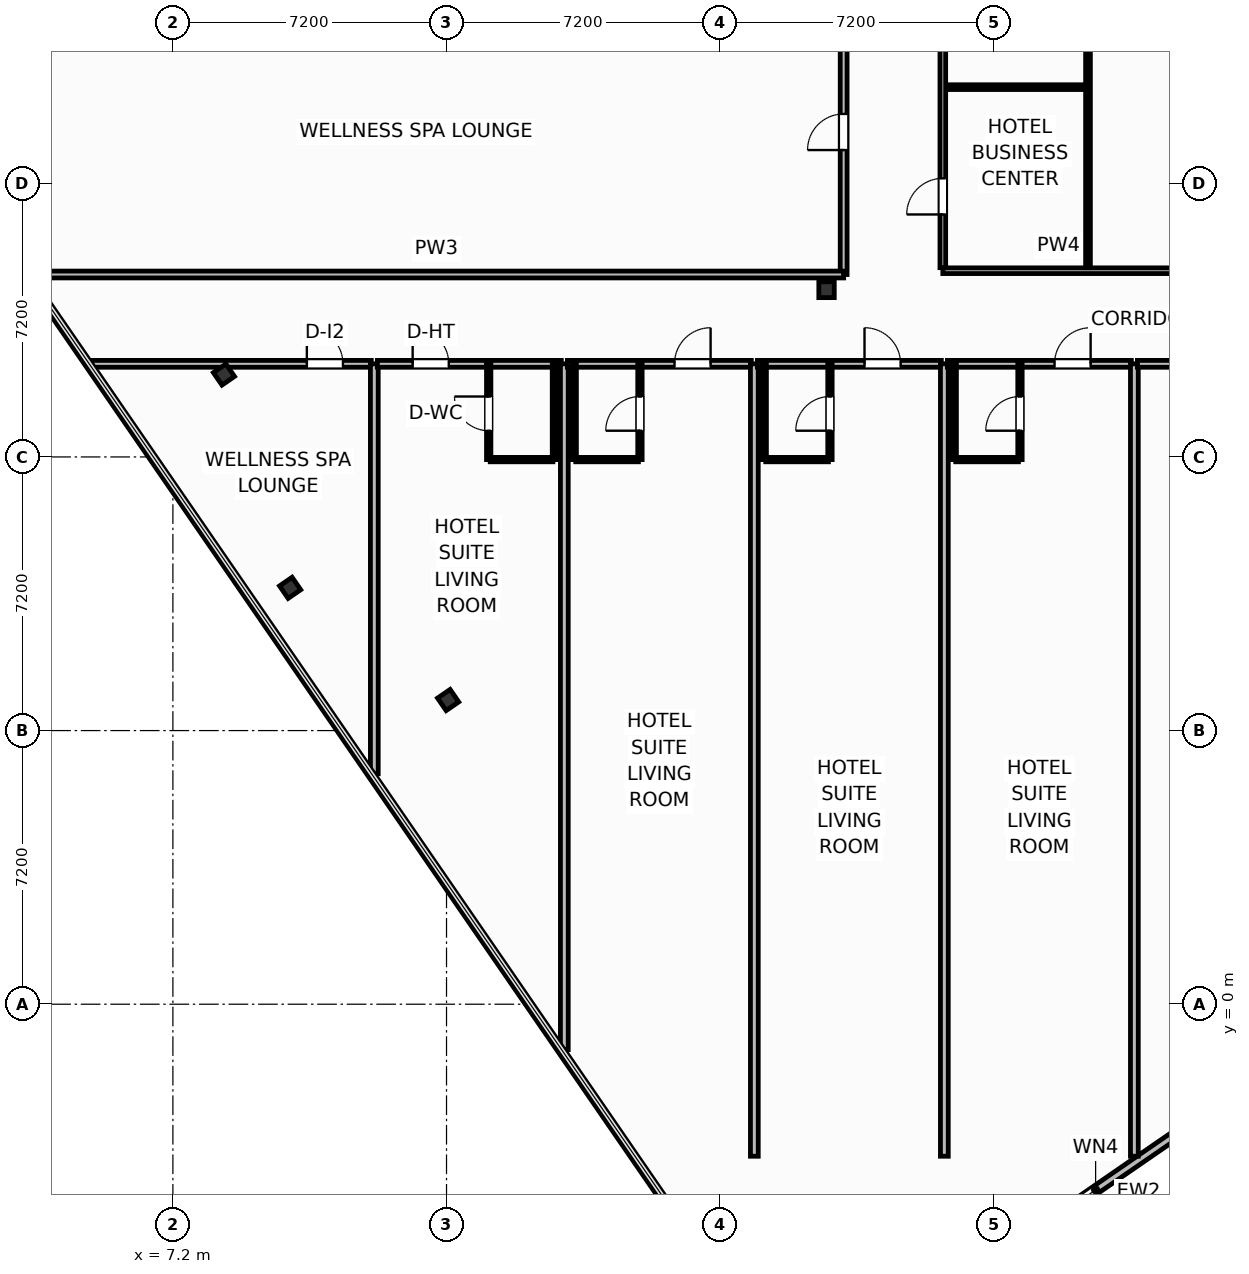
"""IFC4 building model, lengths in metres.
Left out: names, types, materials, properties, quantities, classifications, styles, units other than length and angle.
Written with IfcOpenShell. Run it as: python <this file> out.ifc"""

import sys

from ifc_helpers import new_model, si_unit, direction, frame, frame_2d, origin, origin_2d, place, context, subcontext, project, spatial, rectangle, i_section, extrude, element, fill, save


model = new_model("IFC4")
c1 = context("Model", 3, precision=1e-05, world=origin(), true_north=direction((0.0, 1.0)))
c2 = subcontext(c1, "Body", "Model", "MODEL_VIEW")
j1 = project(units=[si_unit("LENGTHUNIT", "METRE"), si_unit("PLANEANGLEUNIT", "RADIAN")], contexts=[c1])
p1 = place(None, origin())
s1 = spatial("IfcSite", under=j1, at=p1, CompositionType="ELEMENT")
p2 = place(p1, origin())
s2 = spatial("IfcBuilding", under=s1, at=p2, CompositionType="ELEMENT")
p3 = place(p2, frame((0.0, 0.0, 280.4)))
s3 = spatial("IfcBuildingStorey", under=s2, at=p3, CompositionType="ELEMENT", Elevation=280.4)
p4 = place(p3, frame((24.4, 18.8, 0.0), z_axis=(0.0, 0.0, 1.0), x_axis=(1.0, 0.0, 0.0)))
e1 = element("IfcColumn", 1, at=p4, inside=s3, PredefinedType="COLUMN", context=c2, shape_type="SweptSolid", body=[
    extrude(i_section(OverallWidth=0.406, OverallDepth=0.416, WebThickness=0.03, FlangeThickness=0.048, FilletRadius=0.025, at=origin_2d()), origin(), (0.0, 0.0, 1.0), 3.7),
])
for number, where, z_axis, x_axis in (
    (2, (8.543, 16.569, 0.0), (0.0, 0.0, 1.0), (0.824, 0.567, 0.0)),
    (3, (10.284, 10.956, 0.0), (0.0, 0.0, 1.0), (0.824, 0.567, 0.0)),
    (4, (14.443, 8.004, 0.0), (0.0, 0.0, 1.0), (0.824, 0.567, 0.0)),
):
    element("IfcColumn", number, at=place(p3, frame(where, z_axis=z_axis, x_axis=x_axis)), inside=s3, PredefinedType="COLUMN", context=c2, shape_type="SweptSolid", body=[
        extrude(i_section(OverallWidth=0.401, OverallDepth=0.399, WebThickness=0.025, FlangeThickness=0.04, FilletRadius=0.022, at=origin_2d()), origin(), (0.0, 0.0, 1.0), 3.7),
    ])
p5 = place(p3, frame((27.704, -7.488, 0.0), z_axis=(0.0, 0.0, 1.0), x_axis=(0.823529068157, 0.567274073003, 0.0)))
e5 = element("IfcWall", 5, at=p5, inside=s3, PredefinedType="SOLIDWALL", context=c2, shape_type="SweptSolid", body=[
    extrude(rectangle(XDim=10.98, YDim=0.22, at=frame_2d((5.49, 0.0))), origin(), (0.0, 0.0, 1.0), 2.73),
])
p6 = place(p5, frame((2.486, 0.0, 0.8)))
e6 = element("IfcOpeningElement", 6, at=p6, cuts=e5, PredefinedType="OPENING", context=c2, shape_type="SweptSolid", body=[
    extrude(rectangle(XDim=2.1, YDim=1.75, at=frame_2d((1.05, 0.875))), frame((0.0, 0.12, 0.0), z_axis=(0.0, -1.0, 0.0), x_axis=(1.0, 0.0, 0.0)), (0.0, 0.0, 1.0), 0.24),
])
p7 = place(p3, frame((5.038, 16.85, 0.0), z_axis=(0.0, 0.0, 1.0), x_axis=(1.0, 0.0, 0.0)))
e7 = element("IfcWall", 7, at=p7, inside=s3, PredefinedType="PARTITIONING", context=c2, shape_type="SweptSolid", body=[
    extrude(rectangle(XDim=7.382, YDim=0.18, at=frame_2d((3.691, 0.0))), origin(), (0.0, 0.0, 1.0), 2.739),
])
p8 = place(p7, frame((5.687, 0.0, 0.0)))
e8 = element("IfcOpeningElement", 8, at=p8, cuts=e7, PredefinedType="OPENING", context=c2, shape_type="SweptSolid", body=[
    extrude(rectangle(XDim=0.95, YDim=2.05, at=frame_2d((0.475, 1.025))), frame((0.0, 0.1, 0.0), z_axis=(0.0, -1.0, 0.0), x_axis=(1.0, 0.0, 0.0)), (0.0, 0.0, 1.0), 0.2),
])
p9 = place(p3, frame((12.5, 6.064, 0.0), z_axis=(0.0, 0.0, 1.0), x_axis=(0.0, 1.0, 0.0)))
e9 = element("IfcWall", 9, at=p9, inside=s3, PredefinedType="PARTITIONING", context=c2, shape_type="SweptSolid", body=[
    extrude(rectangle(XDim=10.786, YDim=0.205, at=frame_2d((5.393, 0.0))), origin(), (0.0, 0.0, 1.0), 3.45),
])
p10 = place(p3, frame((12.58, 16.85, 0.0), z_axis=(0.0, 0.0, 1.0), x_axis=(1.0, 0.0, 0.0)))
e10 = element("IfcWall", 10, at=p10, inside=s3, PredefinedType="PARTITIONING", context=c2, shape_type="SweptSolid", body=[
    extrude(rectangle(XDim=4.84, YDim=0.18, at=frame_2d((2.42, 0.0))), origin(), (0.0, 0.0, 1.0), 3.45),
])
p11 = place(p10, frame((0.929, 0.0, 0.0)))
e11 = element("IfcOpeningElement", 11, at=p11, cuts=e10, PredefinedType="OPENING", context=c2, shape_type="SweptSolid", body=[
    extrude(rectangle(XDim=0.95, YDim=2.15, at=frame_2d((0.475, 1.075))), frame((0.0, 0.1, 0.0), z_axis=(0.0, -1.0, 0.0), x_axis=(1.0, 0.0, 0.0)), (0.0, 0.0, 1.0), 0.2),
])
p12 = place(p3, frame((15.55, 14.33, 0.0), z_axis=(0.0, 0.0, 1.0), x_axis=(1.0, 0.0, 0.0)))
e12 = element("IfcWall", 12, at=p12, inside=s3, PredefinedType="PARTITIONING", context=c2, shape_type="SweptSolid", body=[
    extrude(rectangle(XDim=1.65, YDim=0.115, at=frame_2d((0.825, 0.0))), origin(), (0.0, 0.0, 1.0), 3.45),
])
p13 = place(p3, frame((15.51, 14.33, 0.0), z_axis=(0.0, 0.0, 1.0), x_axis=(0.0, 1.0, 0.0)))
e13 = element("IfcWall", 13, at=p13, inside=s3, PredefinedType="PARTITIONING", context=c2, shape_type="SweptSolid", body=[
    extrude(rectangle(XDim=2.52, YDim=0.115, at=frame_2d((1.26, 0.0))), origin(), (0.0, 0.0, 1.0), 3.45),
])
p14 = place(p13, frame((0.76, 0.0, 0.0)))
e14 = element("IfcOpeningElement", 14, at=p14, cuts=e13, PredefinedType="OPENING", context=c2, shape_type="SweptSolid", body=[
    extrude(rectangle(XDim=0.9, YDim=2.05, at=frame_2d((0.45, 1.025))), frame((0.0, 0.067, 0.0), z_axis=(0.0, -1.0, 0.0), x_axis=(1.0, 0.0, 0.0)), (0.0, 0.0, 1.0), 0.135),
])
p15 = place(p3, frame((17.24, 14.33, 0.0), z_axis=(0.0, 0.0, 1.0), x_axis=(0.0, 1.0, 0.0)))
e15 = element("IfcWall", 15, at=p15, inside=s3, PredefinedType="PARTITIONING", context=c2, shape_type="SweptSolid", body=[
    extrude(rectangle(XDim=2.52, YDim=0.115, at=frame_2d((1.26, 0.0))), origin(), (0.0, 0.0, 1.0), 3.45),
])
p16 = place(p3, frame((17.5, -1.195, 0.0), z_axis=(0.0, 0.0, 1.0), x_axis=(0.0, 1.0, 0.0)))
e16 = element("IfcWall", 16, at=p16, inside=s3, PredefinedType="PARTITIONING", context=c2, shape_type="SweptSolid", body=[
    extrude(rectangle(XDim=18.045, YDim=0.205, at=frame_2d((9.022, 0.0))), origin(), (0.0, 0.0, 1.0), 3.45),
])
p17 = place(p3, frame((17.58, 16.85, 0.0), z_axis=(0.0, 0.0, 1.0), x_axis=(1.0, 0.0, 0.0)))
e17 = element("IfcWall", 17, at=p17, inside=s3, PredefinedType="PARTITIONING", context=c2, shape_type="SweptSolid", body=[
    extrude(rectangle(XDim=4.84, YDim=0.18, at=frame_2d((2.42, 0.0))), origin(), (0.0, 0.0, 1.0), 3.45),
])
p18 = place(p17, frame((2.819, 0.0, 0.0)))
e18 = element("IfcOpeningElement", 18, at=p18, cuts=e17, PredefinedType="OPENING", context=c2, shape_type="SweptSolid", body=[
    extrude(rectangle(XDim=0.95, YDim=2.15, at=frame_2d((0.475, 1.075))), frame((0.0, 0.1, 0.0), z_axis=(0.0, -1.0, 0.0), x_axis=(1.0, 0.0, 0.0)), (0.0, 0.0, 1.0), 0.2),
])
p19 = place(p3, frame((17.8, 14.33, 0.0), z_axis=(0.0, 0.0, 1.0), x_axis=(1.0, 0.0, 0.0)))
e19 = element("IfcWall", 19, at=p19, inside=s3, PredefinedType="PARTITIONING", context=c2, shape_type="SweptSolid", body=[
    extrude(rectangle(XDim=1.65, YDim=0.115, at=frame_2d((0.825, 0.0))), origin(), (0.0, 0.0, 1.0), 3.45),
])
p20 = place(p3, frame((19.49, 14.33, 0.0), z_axis=(0.0, 0.0, 1.0), x_axis=(0.0, 1.0, 0.0)))
e20 = element("IfcWall", 20, at=p20, inside=s3, PredefinedType="PARTITIONING", context=c2, shape_type="SweptSolid", body=[
    extrude(rectangle(XDim=2.52, YDim=0.115, at=frame_2d((1.26, 0.0))), origin(), (0.0, 0.0, 1.0), 3.45),
])
p21 = place(p20, frame((0.76, 0.0, 0.0)))
e21 = element("IfcOpeningElement", 21, at=p21, cuts=e20, PredefinedType="OPENING", context=c2, shape_type="SweptSolid", body=[
    extrude(rectangle(XDim=0.9, YDim=2.05, at=frame_2d((0.45, 1.025))), frame((0.0, 0.067, 0.0), z_axis=(0.0, -1.0, 0.0), x_axis=(1.0, 0.0, 0.0)), (0.0, 0.0, 1.0), 0.135),
])
p22 = place(p3, frame((17.76, 14.33, 0.0), z_axis=(0.0, 0.0, 1.0), x_axis=(0.0, 1.0, 0.0)))
e22 = element("IfcWall", 22, at=p22, inside=s3, PredefinedType="PARTITIONING", context=c2, shape_type="SweptSolid", body=[
    extrude(rectangle(XDim=2.52, YDim=0.115, at=frame_2d((1.26, 0.0))), origin(), (0.0, 0.0, 1.0), 3.45),
])
p23 = place(p3, frame((22.5, -4.0, 0.0), z_axis=(0.0, 0.0, 1.0), x_axis=(0.0, 1.0, 0.0)))
e23 = element("IfcWall", 23, at=p23, inside=s3, PredefinedType="PARTITIONING", context=c2, shape_type="SweptSolid", body=[
    extrude(rectangle(XDim=20.85, YDim=0.205, at=frame_2d((10.425, 0.0))), origin(), (0.0, 0.0, 1.0), 3.45),
])
p24 = place(p3, frame((22.58, 16.85, 0.0), z_axis=(0.0, 0.0, 1.0), x_axis=(1.0, 0.0, 0.0)))
e24 = element("IfcWall", 24, at=p24, inside=s3, PredefinedType="PARTITIONING", context=c2, shape_type="SweptSolid", body=[
    extrude(rectangle(XDim=4.84, YDim=0.18, at=frame_2d((2.42, 0.0))), origin(), (0.0, 0.0, 1.0), 3.45),
])
p25 = place(p24, frame((2.819, 0.0, 0.0)))
e25 = element("IfcOpeningElement", 25, at=p25, cuts=e24, PredefinedType="OPENING", context=c2, shape_type="SweptSolid", body=[
    extrude(rectangle(XDim=0.95, YDim=2.15, at=frame_2d((0.475, 1.075))), frame((0.0, 0.1, 0.0), z_axis=(0.0, -1.0, 0.0), x_axis=(1.0, 0.0, 0.0)), (0.0, 0.0, 1.0), 0.2),
])
p26 = place(p3, frame((22.8, 14.33, 0.0), z_axis=(0.0, 0.0, 1.0), x_axis=(1.0, 0.0, 0.0)))
e26 = element("IfcWall", 26, at=p26, inside=s3, PredefinedType="PARTITIONING", context=c2, shape_type="SweptSolid", body=[
    extrude(rectangle(XDim=1.65, YDim=0.115, at=frame_2d((0.825, 0.0))), origin(), (0.0, 0.0, 1.0), 3.45),
])
p27 = place(p3, frame((24.49, 14.33, 0.0), z_axis=(0.0, 0.0, 1.0), x_axis=(0.0, 1.0, 0.0)))
e27 = element("IfcWall", 27, at=p27, inside=s3, PredefinedType="PARTITIONING", context=c2, shape_type="SweptSolid", body=[
    extrude(rectangle(XDim=2.52, YDim=0.115, at=frame_2d((1.26, 0.0))), origin(), (0.0, 0.0, 1.0), 3.45),
])
p28 = place(p27, frame((0.76, 0.0, 0.0)))
e28 = element("IfcOpeningElement", 28, at=p28, cuts=e27, PredefinedType="OPENING", context=c2, shape_type="SweptSolid", body=[
    extrude(rectangle(XDim=0.9, YDim=2.05, at=frame_2d((0.45, 1.025))), frame((0.0, 0.067, 0.0), z_axis=(0.0, -1.0, 0.0), x_axis=(1.0, 0.0, 0.0)), (0.0, 0.0, 1.0), 0.135),
])
p29 = place(p3, frame((22.76, 14.33, 0.0), z_axis=(0.0, 0.0, 1.0), x_axis=(0.0, 1.0, 0.0)))
e29 = element("IfcWall", 29, at=p29, inside=s3, PredefinedType="PARTITIONING", context=c2, shape_type="SweptSolid", body=[
    extrude(rectangle(XDim=2.52, YDim=0.115, at=frame_2d((1.26, 0.0))), origin(), (0.0, 0.0, 1.0), 3.45),
])
p30 = place(p3, frame((27.5, -4.0, 0.0), z_axis=(0.0, 0.0, 1.0), x_axis=(0.0, 1.0, 0.0)))
e30 = element("IfcWall", 30, at=p30, inside=s3, PredefinedType="PARTITIONING", context=c2, shape_type="SweptSolid", body=[
    extrude(rectangle(XDim=20.85, YDim=0.205, at=frame_2d((10.425, 0.0))), origin(), (0.0, 0.0, 1.0), 3.45),
])
p31 = place(p3, frame((27.58, 16.85, 0.0), z_axis=(0.0, 0.0, 1.0), x_axis=(1.0, 0.0, 0.0)))
e31 = element("IfcWall", 31, at=p31, inside=s3, PredefinedType="PARTITIONING", context=c2, shape_type="SweptSolid", body=[
    extrude(rectangle(XDim=4.84, YDim=0.18, at=frame_2d((2.42, 0.0))), origin(), (0.0, 0.0, 1.0), 3.45),
])
p32 = place(p31, frame((2.819, 0.0, 0.0)))
e32 = element("IfcOpeningElement", 32, at=p32, cuts=e31, PredefinedType="OPENING", context=c2, shape_type="SweptSolid", body=[
    extrude(rectangle(XDim=0.95, YDim=2.15, at=frame_2d((0.475, 1.075))), frame((0.0, 0.1, 0.0), z_axis=(0.0, -1.0, 0.0), x_axis=(1.0, 0.0, 0.0)), (0.0, 0.0, 1.0), 0.2),
])
p33 = place(p3, frame((27.8, 14.33, 0.0), z_axis=(0.0, 0.0, 1.0), x_axis=(1.0, 0.0, 0.0)))
e33 = element("IfcWall", 33, at=p33, inside=s3, PredefinedType="PARTITIONING", context=c2, shape_type="SweptSolid", body=[
    extrude(rectangle(XDim=1.65, YDim=0.115, at=frame_2d((0.825, 0.0))), origin(), (0.0, 0.0, 1.0), 3.45),
])
p34 = place(p3, frame((29.49, 14.33, 0.0), z_axis=(0.0, 0.0, 1.0), x_axis=(0.0, 1.0, 0.0)))
e34 = element("IfcWall", 34, at=p34, inside=s3, PredefinedType="PARTITIONING", context=c2, shape_type="SweptSolid", body=[
    extrude(rectangle(XDim=2.52, YDim=0.115, at=frame_2d((1.26, 0.0))), origin(), (0.0, 0.0, 1.0), 3.45),
])
p35 = place(p34, frame((0.76, 0.0, 0.0)))
e35 = element("IfcOpeningElement", 35, at=p35, cuts=e34, PredefinedType="OPENING", context=c2, shape_type="SweptSolid", body=[
    extrude(rectangle(XDim=0.9, YDim=2.05, at=frame_2d((0.45, 1.025))), frame((0.0, 0.067, 0.0), z_axis=(0.0, -1.0, 0.0), x_axis=(1.0, 0.0, 0.0)), (0.0, 0.0, 1.0), 0.135),
])
p36 = place(p3, frame((27.76, 14.33, 0.0), z_axis=(0.0, 0.0, 1.0), x_axis=(0.0, 1.0, 0.0)))
e36 = element("IfcWall", 36, at=p36, inside=s3, PredefinedType="PARTITIONING", context=c2, shape_type="SweptSolid", body=[
    extrude(rectangle(XDim=2.52, YDim=0.115, at=frame_2d((1.26, 0.0))), origin(), (0.0, 0.0, 1.0), 3.45),
])
p37 = place(p3, frame((32.5, -4.0, 0.0), z_axis=(0.0, 0.0, 1.0), x_axis=(0.0, 1.0, 0.0)))
e37 = element("IfcWall", 37, at=p37, inside=s3, PredefinedType="PARTITIONING", context=c2, shape_type="SweptSolid", body=[
    extrude(rectangle(XDim=20.85, YDim=0.205, at=frame_2d((10.425, 0.0))), origin(), (0.0, 0.0, 1.0), 3.45),
])
p38 = place(p3, frame((32.58, 16.85, 0.0), z_axis=(0.0, 0.0, 1.0), x_axis=(1.0, 0.0, 0.0)))
e38 = element("IfcWall", 38, at=p38, inside=s3, PredefinedType="PARTITIONING", context=c2, shape_type="SweptSolid", body=[
    extrude(rectangle(XDim=4.84, YDim=0.18, at=frame_2d((2.42, 0.0))), origin(), (0.0, 0.0, 1.0), 3.45),
])
p39 = place(p38, frame((0.929, 0.0, 0.0)))
e39 = element("IfcOpeningElement", 39, at=p39, cuts=e38, PredefinedType="OPENING", context=c2, shape_type="SweptSolid", body=[
    extrude(rectangle(XDim=0.95, YDim=2.15, at=frame_2d((0.475, 1.075))), frame((0.0, 0.1, 0.0), z_axis=(0.0, -1.0, 0.0), x_axis=(1.0, 0.0, 0.0)), (0.0, 0.0, 1.0), 0.2),
])
p40 = place(p3, frame((24.85, 19.2, 0.0), z_axis=(0.0, 0.0, 1.0), x_axis=(0.0, 1.0, 0.0)))
e40 = element("IfcWall", 40, at=p40, inside=s3, PredefinedType="PARTITIONING", context=c2, shape_type="SweptSolid", body=[
    extrude(rectangle(XDim=7.5, YDim=0.18, at=frame_2d((3.75, 0.0))), origin(), (0.0, 0.0, 1.0), 3.45),
])
p41 = place(p40, frame((3.275, 0.0, 0.0)))
e41 = element("IfcOpeningElement", 41, at=p41, cuts=e40, PredefinedType="OPENING", context=c2, shape_type="SweptSolid", body=[
    extrude(rectangle(XDim=0.95, YDim=2.05, at=frame_2d((0.475, 1.025))), frame((0.0, 0.1, 0.0), z_axis=(0.0, -1.0, 0.0), x_axis=(1.0, 0.0, 0.0)), (0.0, 0.0, 1.0), 0.2),
])
p42 = place(p3, frame((3.419, 19.2, 0.0), z_axis=(0.0, 0.0, 1.0), x_axis=(1.0, 0.0, 0.0)))
e42 = element("IfcWall", 42, at=p42, inside=s3, PredefinedType="PARTITIONING", context=c2, shape_type="SweptSolid", body=[
    extrude(rectangle(XDim=21.431, YDim=0.18, at=frame_2d((10.715, 0.0))), origin(), (0.0, 0.0, 1.0), 3.45),
])
p43 = place(p3, frame((27.46, 19.3, 0.0), z_axis=(0.0, 0.0, 1.0), x_axis=(1.0, 0.0, 0.0)))
e43 = element("IfcWall", 43, at=p43, inside=s3, PredefinedType="PARTITIONING", context=c2, shape_type="SweptSolid", body=[
    extrude(rectangle(XDim=6.1, YDim=0.15, at=frame_2d((3.05, 0.0))), origin(), (0.0, 0.0, 1.0), 2.662),
])
p44 = place(p3, frame((31.28, 19.38, 0.0), z_axis=(0.0, 0.0, 1.0), x_axis=(0.0, 1.0, 0.0)))
e44 = element("IfcWall", 44, at=p44, inside=s3, PredefinedType="PARTITIONING", context=c2, shape_type="SweptSolid", body=[
    extrude(rectangle(XDim=7.16, YDim=0.125, at=frame_2d((3.58, 0.0))), origin(), (0.0, 0.0, 1.0), 3.45),
])
p45 = place(p3, frame((27.52, 24.13, 0.0), z_axis=(0.0, 0.0, 1.0), x_axis=(1.0, 0.0, 0.0)))
e45 = element("IfcWall", 45, at=p45, inside=s3, PredefinedType="PARTITIONING", context=c2, shape_type="SweptSolid", body=[
    extrude(rectangle(XDim=3.7, YDim=0.125, at=frame_2d((1.85, 0.0))), origin(), (0.0, 0.0, 1.0), 3.45),
])
p46 = place(p3, frame((27.46, 19.38, 0.0), z_axis=(0.0, 0.0, 1.0), x_axis=(0.0, 1.0, 0.0)))
e46 = element("IfcWall", 46, at=p46, inside=s3, PredefinedType="PARTITIONING", context=c2, shape_type="SweptSolid", body=[
    extrude(rectangle(XDim=7.16, YDim=0.15, at=frame_2d((3.58, 0.0))), origin(), (0.0, 0.0, 1.0), 3.45),
])
p47 = place(p46, frame((1.4, 0.0, 0.0)))
e47 = element("IfcOpeningElement", 47, at=p47, cuts=e46, PredefinedType="OPENING", context=c2, shape_type="SweptSolid", body=[
    extrude(rectangle(XDim=0.95, YDim=2.05, at=frame_2d((0.475, 1.025))), frame((0.0, 0.085, 0.0), z_axis=(0.0, -1.0, 0.0), x_axis=(1.0, 0.0, 0.0)), (0.0, 0.0, 1.0), 0.17),
])
p48 = place(p6, origin())
e48 = element("IfcWindow", 48, at=p48, inside=s3, PartitioningType="SINGLE_PANEL", PredefinedType="WINDOW", context=c2, shape_type="SweptSolid", body=[
    extrude(rectangle(XDim=2.1, YDim=1.75, at=frame_2d((1.05, 0.875))), frame((0.0, 0.03, 0.0), z_axis=(0.0, -1.0, 0.0), x_axis=(1.0, 0.0, 0.0)), (0.0, 0.0, 1.0), 0.06),
])
fill(e6, e48)
p49 = place(p8, origin())
e49 = element("IfcDoor", 49, at=p49, inside=s3, OperationType="SINGLE_SWING_LEFT", PredefinedType="DOOR", context=c2, shape_type="SweptSolid", body=[
    extrude(rectangle(XDim=0.95, YDim=2.05, at=frame_2d((0.475, 1.025))), frame((0.0, 0.025, 0.0), z_axis=(0.0, -1.0, 0.0), x_axis=(1.0, 0.0, 0.0)), (0.0, 0.0, 1.0), 0.05),
])
fill(e8, e49)
p50 = place(p11, origin())
e50 = element("IfcDoor", 50, at=p50, inside=s3, OperationType="SINGLE_SWING_LEFT", PredefinedType="DOOR", context=c2, shape_type="SweptSolid", body=[
    extrude(rectangle(XDim=0.95, YDim=2.15, at=frame_2d((0.475, 1.075))), frame((0.0, 0.025, 0.0), z_axis=(0.0, -1.0, 0.0), x_axis=(1.0, 0.0, 0.0)), (0.0, 0.0, 1.0), 0.05),
])
fill(e11, e50)
p51 = place(p14, origin())
e51 = element("IfcDoor", 51, at=p51, inside=s3, OperationType="SINGLE_SWING_RIGHT", PredefinedType="DOOR", context=c2, shape_type="SweptSolid", body=[
    extrude(rectangle(XDim=0.9, YDim=2.05, at=frame_2d((0.45, 1.025))), frame((0.0, 0.025, 0.0), z_axis=(0.0, -1.0, 0.0), x_axis=(1.0, 0.0, 0.0)), (0.0, 0.0, 1.0), 0.05),
])
fill(e14, e51)
p52 = place(p18, origin())
e52 = element("IfcDoor", 52, at=p52, inside=s3, OperationType="SINGLE_SWING_RIGHT", PredefinedType="DOOR", context=c2, shape_type="SweptSolid", body=[
    extrude(rectangle(XDim=0.95, YDim=2.15, at=frame_2d((0.475, 1.075))), frame((0.0, 0.025, 0.0), z_axis=(0.0, -1.0, 0.0), x_axis=(1.0, 0.0, 0.0)), (0.0, 0.0, 1.0), 0.05),
])
fill(e18, e52)
p53 = place(p21, origin())
e53 = element("IfcDoor", 53, at=p53, inside=s3, OperationType="SINGLE_SWING_LEFT", PredefinedType="DOOR", context=c2, shape_type="SweptSolid", body=[
    extrude(rectangle(XDim=0.9, YDim=2.05, at=frame_2d((0.45, 1.025))), frame((0.0, 0.025, 0.0), z_axis=(0.0, -1.0, 0.0), x_axis=(1.0, 0.0, 0.0)), (0.0, 0.0, 1.0), 0.05),
])
fill(e21, e53)
p54 = place(p25, origin())
e54 = element("IfcDoor", 54, at=p54, inside=s3, OperationType="SINGLE_SWING_LEFT", PredefinedType="DOOR", context=c2, shape_type="SweptSolid", body=[
    extrude(rectangle(XDim=0.95, YDim=2.15, at=frame_2d((0.475, 1.075))), frame((0.0, 0.025, 0.0), z_axis=(0.0, -1.0, 0.0), x_axis=(1.0, 0.0, 0.0)), (0.0, 0.0, 1.0), 0.05),
])
fill(e25, e54)
p55 = place(p28, origin())
e55 = element("IfcDoor", 55, at=p55, inside=s3, OperationType="SINGLE_SWING_LEFT", PredefinedType="DOOR", context=c2, shape_type="SweptSolid", body=[
    extrude(rectangle(XDim=0.9, YDim=2.05, at=frame_2d((0.45, 1.025))), frame((0.0, 0.025, 0.0), z_axis=(0.0, -1.0, 0.0), x_axis=(1.0, 0.0, 0.0)), (0.0, 0.0, 1.0), 0.05),
])
fill(e28, e55)
p56 = place(p32, origin())
e56 = element("IfcDoor", 56, at=p56, inside=s3, OperationType="SINGLE_SWING_RIGHT", PredefinedType="DOOR", context=c2, shape_type="SweptSolid", body=[
    extrude(rectangle(XDim=0.95, YDim=2.15, at=frame_2d((0.475, 1.075))), frame((0.0, 0.025, 0.0), z_axis=(0.0, -1.0, 0.0), x_axis=(1.0, 0.0, 0.0)), (0.0, 0.0, 1.0), 0.05),
])
fill(e32, e56)
p57 = place(p35, origin())
e57 = element("IfcDoor", 57, at=p57, inside=s3, OperationType="SINGLE_SWING_LEFT", PredefinedType="DOOR", context=c2, shape_type="SweptSolid", body=[
    extrude(rectangle(XDim=0.9, YDim=2.05, at=frame_2d((0.45, 1.025))), frame((0.0, 0.025, 0.0), z_axis=(0.0, -1.0, 0.0), x_axis=(1.0, 0.0, 0.0)), (0.0, 0.0, 1.0), 0.05),
])
fill(e35, e57)
p58 = place(p41, origin())
e58 = element("IfcDoor", 58, at=p58, inside=s3, OperationType="SINGLE_SWING_LEFT", PredefinedType="DOOR", context=c2, shape_type="SweptSolid", body=[
    extrude(rectangle(XDim=0.95, YDim=2.05, at=frame_2d((0.475, 1.025))), frame((0.0, 0.025, 0.0), z_axis=(0.0, -1.0, 0.0), x_axis=(1.0, 0.0, 0.0)), (0.0, 0.0, 1.0), 0.05),
])
fill(e41, e58)
p59 = place(p47, origin())
e59 = element("IfcDoor", 59, at=p59, inside=s3, OperationType="SINGLE_SWING_LEFT", PredefinedType="DOOR", context=c2, shape_type="SweptSolid", body=[
    extrude(rectangle(XDim=0.95, YDim=2.05, at=frame_2d((0.475, 1.025))), frame((0.0, 0.025, 0.0), z_axis=(0.0, -1.0, 0.0), x_axis=(1.0, 0.0, 0.0)), (0.0, 0.0, 1.0), 0.05),
])
fill(e47, e59)
save(model, sys.argv[1])
